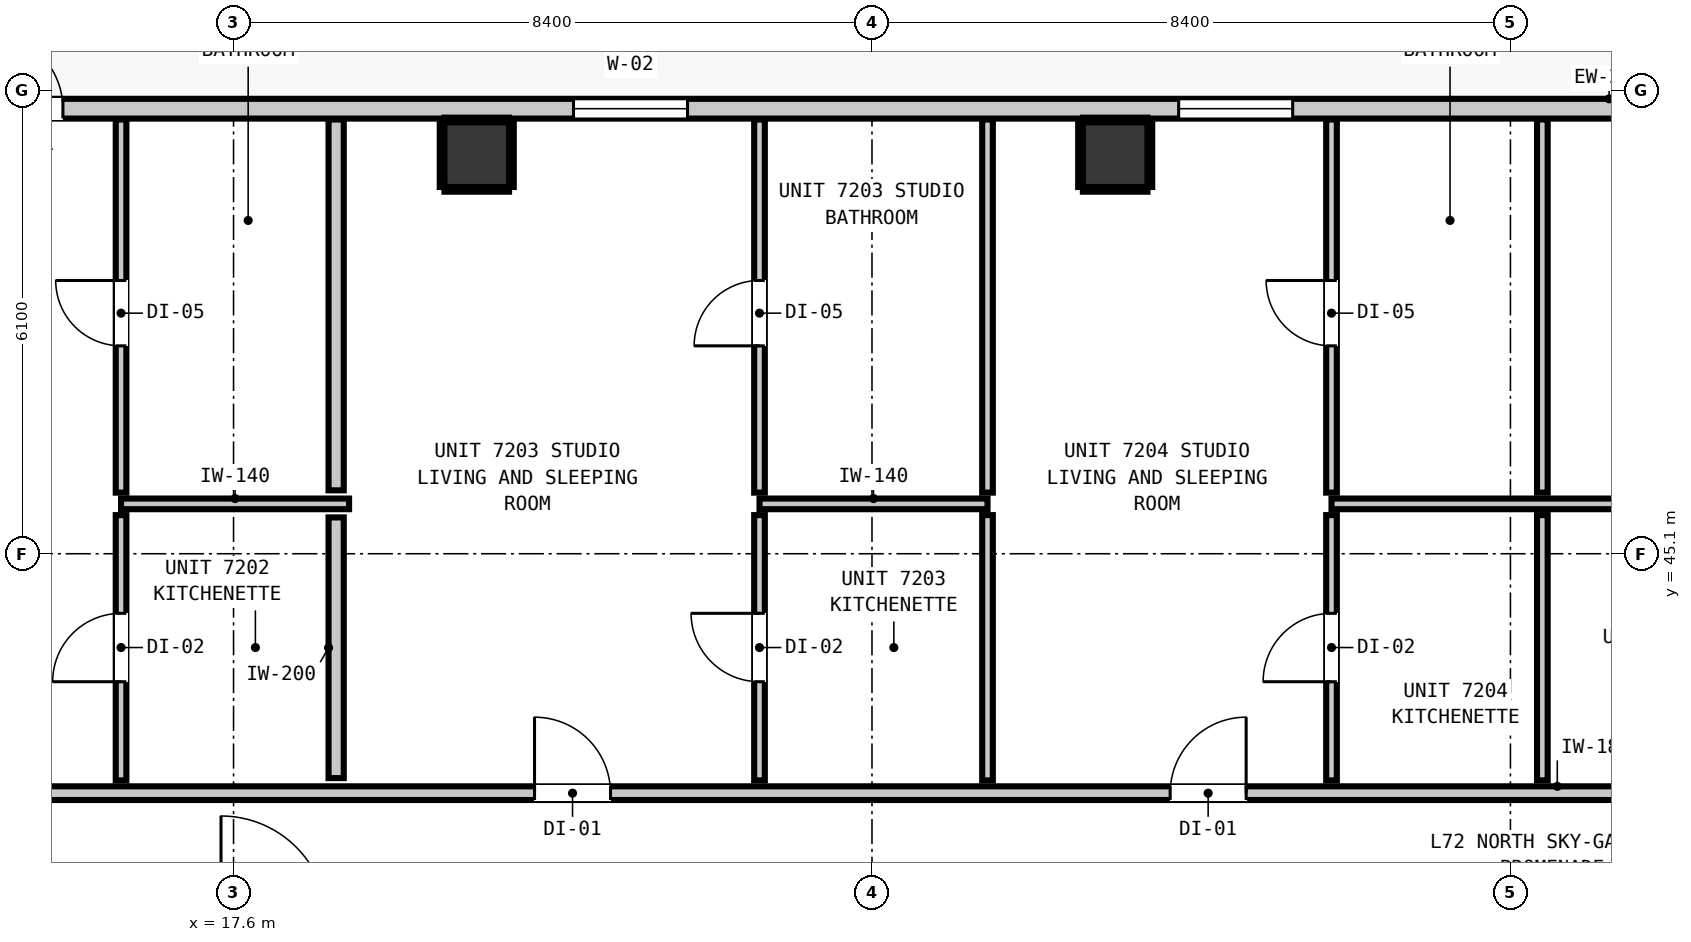
"""IFC4 building model, lengths in metres.
Left out: names, types, materials, properties, quantities, classifications, styles, units other than length and angle.
Written with IfcOpenShell. Run it as: python <this file> out.ifc"""

import sys

from ifc_helpers import new_model, si_unit, direction, frame, frame_2d, origin, origin_2d, place, context, subcontext, project, spatial, rectangle, extrude, element, fill, save


model = new_model("IFC4")
c1 = context("Model", 3, precision=1e-05, world=origin(), true_north=direction((0.0, 1.0)))
c2 = subcontext(c1, "Body", "Model", "MODEL_VIEW")
j1 = project(units=[si_unit("LENGTHUNIT", "METRE"), si_unit("PLANEANGLEUNIT", "RADIAN")], contexts=[c1])
p1 = place(None, origin())
s1 = spatial("IfcSite", under=j1, at=p1, CompositionType="ELEMENT")
p2 = place(p1, origin())
s2 = spatial("IfcBuilding", under=s1, at=p2, CompositionType="ELEMENT")
p3 = place(p2, frame((0.0, 0.0, 247.88)))
s3 = spatial("IfcBuildingStorey", under=s2, at=p3, CompositionType="ELEMENT", Elevation=247.88)
for number, where, z_axis, x_axis in (
    (1, (20.8, 50.35, 0.0), (0.0, 0.0, 1.0), (1.0, 0.0, 0.0)),
    (2, (29.2, 50.35, 0.0), (0.0, 0.0, 1.0), (1.0, 0.0, 0.0)),
):
    element("IfcColumn", number, at=place(p3, frame(where, z_axis=z_axis, x_axis=x_axis)), inside=s3, PredefinedType="COLUMN", context=c2, shape_type="SweptSolid", body=[
        extrude(rectangle(XDim=0.85, YDim=0.85, at=origin_2d()), origin(), (0.0, 0.0, 1.0), 2.9),
    ])
p4 = place(p3, frame((12.745, 50.955, 0.0), z_axis=(0.0, 0.0, 1.0), x_axis=(1.0, 0.0, 0.0)))
e3 = element("IfcWall", 3, at=p4, inside=s3, PredefinedType="STANDARD", context=c2, shape_type="SweptSolid", body=[
    extrude(rectangle(XDim=32.71, YDim=0.26, at=frame_2d((16.355, 0.0))), origin(), (0.0, 0.0, 1.0), 2.9),
])
p5 = place(p4, frame((1.61, 0.0, 0.0)))
e4 = element("IfcOpeningElement", 4, at=p5, cuts=e3, PredefinedType="OPENING", context=c2, shape_type="SweptSolid", body=[
    extrude(rectangle(XDim=1.0, YDim=2.15, at=frame_2d((0.5, 1.075))), frame((0.0, 0.14, 0.0), z_axis=(0.0, -1.0, 0.0), x_axis=(1.0, 0.0, 0.0)), (0.0, 0.0, 1.0), 0.28),
])
p6 = place(p4, frame((9.328, 0.0, 0.85)))
e5 = element("IfcOpeningElement", 5, at=p6, cuts=e3, PredefinedType="OPENING", context=c2, shape_type="SweptSolid", body=[
    extrude(rectangle(XDim=1.5, YDim=1.8, at=frame_2d((0.75, 0.9))), frame((0.0, 0.14, 0.0), z_axis=(0.0, -1.0, 0.0), x_axis=(1.0, 0.0, 0.0)), (0.0, 0.0, 1.0), 0.28),
])
p7 = place(p4, frame((17.29, 0.0, 0.85)))
e6 = element("IfcOpeningElement", 6, at=p7, cuts=e3, PredefinedType="OPENING", context=c2, shape_type="SweptSolid", body=[
    extrude(rectangle(XDim=1.5, YDim=1.8, at=frame_2d((0.75, 0.9))), frame((0.0, 0.14, 0.0), z_axis=(0.0, -1.0, 0.0), x_axis=(1.0, 0.0, 0.0)), (0.0, 0.0, 1.0), 0.28),
])
p8 = place(p4, frame((27.117, 0.0, 0.85)))
e7 = element("IfcOpeningElement", 7, at=p8, cuts=e3, PredefinedType="OPENING", context=c2, shape_type="SweptSolid", body=[
    extrude(rectangle(XDim=1.5, YDim=1.8, at=frame_2d((0.75, 0.9))), frame((0.0, 0.14, 0.0), z_axis=(0.0, -1.0, 0.0), x_axis=(1.0, 0.0, 0.0)), (0.0, 0.0, 1.0), 0.28),
])
p9 = place(p3, frame((10.787, 41.95, 0.0), z_axis=(0.0, 0.0, 1.0), x_axis=(1.0, 0.0, 0.0)))
e8 = element("IfcWall", 8, at=p9, inside=s3, PredefinedType="PARTITIONING", context=c2, shape_type="SweptSolid", body=[
    extrude(rectangle(XDim=36.626, YDim=0.18, at=frame_2d((18.313, 0.0))), origin(), (0.0, 0.0, 1.0), 2.9),
])
p10 = place(p9, frame((3.397, 0.0, 0.0)))
e9 = element("IfcOpeningElement", 9, at=p10, cuts=e8, PredefinedType="OPENING", context=c2, shape_type="SweptSolid", body=[
    extrude(rectangle(XDim=1.0, YDim=2.15, at=frame_2d((0.5, 1.075))), frame((0.0, 0.1, 0.0), z_axis=(0.0, -1.0, 0.0), x_axis=(1.0, 0.0, 0.0)), (0.0, 0.0, 1.0), 0.2),
])
p11 = place(p9, frame((10.773, 0.0, 0.0)))
e10 = element("IfcOpeningElement", 10, at=p11, cuts=e8, PredefinedType="OPENING", context=c2, shape_type="SweptSolid", body=[
    extrude(rectangle(XDim=1.0, YDim=2.15, at=frame_2d((0.5, 1.075))), frame((0.0, 0.1, 0.0), z_axis=(0.0, -1.0, 0.0), x_axis=(1.0, 0.0, 0.0)), (0.0, 0.0, 1.0), 0.2),
])
p12 = place(p9, frame((19.136, 0.0, 0.0)))
e11 = element("IfcOpeningElement", 11, at=p12, cuts=e8, PredefinedType="OPENING", context=c2, shape_type="SweptSolid", body=[
    extrude(rectangle(XDim=1.0, YDim=2.15, at=frame_2d((0.5, 1.075))), frame((0.0, 0.1, 0.0), z_axis=(0.0, -1.0, 0.0), x_axis=(1.0, 0.0, 0.0)), (0.0, 0.0, 1.0), 0.2),
])
p13 = place(p9, frame((28.323, 0.0, 0.0)))
e12 = element("IfcOpeningElement", 12, at=p13, cuts=e8, PredefinedType="OPENING", context=c2, shape_type="SweptSolid", body=[
    extrude(rectangle(XDim=1.0, YDim=2.15, at=frame_2d((0.5, 1.075))), frame((0.0, 0.1, 0.0), z_axis=(0.0, -1.0, 0.0), x_axis=(1.0, 0.0, 0.0)), (0.0, 0.0, 1.0), 0.2),
])
for number, where, z_axis, x_axis in (
    (13, (16.12, 45.756, 0.0), (0.0, 0.0, 1.0), (1.0, 0.0, 0.0)),
    (14, (24.52, 45.756, 0.0), (0.0, 0.0, 1.0), (1.0, 0.0, 0.0)),
):
    element("IfcWall", number, at=place(p3, frame(where, z_axis=z_axis, x_axis=x_axis)), inside=s3, PredefinedType="PARTITIONING", context=c2, shape_type="SweptSolid", body=[
        extrude(rectangle(XDim=3.0, YDim=0.14, at=frame_2d((1.5, 0.0))), origin(), (0.0, 0.0, 1.0), 2.9),
    ])
p14 = place(p3, frame((32.046, 45.756, 0.0), z_axis=(0.0, 0.0, 1.0), x_axis=(1.0, 0.0, 0.0)))
e15 = element("IfcWall", 15, at=p14, inside=s3, PredefinedType="PARTITIONING", context=c2, shape_type="SweptSolid", body=[
    extrude(rectangle(XDim=15.367, YDim=0.14, at=frame_2d((7.684, 0.0))), origin(), (0.0, 0.0, 1.0), 2.9),
])
p15 = place(p14, frame((7.114, 0.0, 0.0)))
e16 = element("IfcOpeningElement", 16, at=p15, cuts=e15, PredefinedType="OPENING", context=c2, shape_type="SweptSolid", body=[
    extrude(rectangle(XDim=0.9, YDim=2.1, at=frame_2d((0.45, 1.05))), frame((0.0, 0.08, 0.0), z_axis=(0.0, -1.0, 0.0), x_axis=(1.0, 0.0, 0.0)), (0.0, 0.0, 1.0), 0.16),
])
p16 = place(p3, frame((18.95, 42.148, 0.0), z_axis=(0.0, 0.0, 1.0), x_axis=(0.0, 1.0, 0.0)))
e17 = element("IfcWall", 17, at=p16, inside=s3, PredefinedType="PARTITIONING", context=c2, shape_type="SweptSolid", body=[
    extrude(rectangle(XDim=3.43, YDim=0.2, at=frame_2d((1.715, 0.0))), origin(), (0.0, 0.0, 1.0), 2.9),
])
p17 = place(p3, frame((18.95, 45.934, 0.0), z_axis=(0.0, 0.0, 1.0), x_axis=(0.0, 1.0, 0.0)))
e18 = element("IfcWall", 18, at=p17, inside=s3, PredefinedType="PARTITIONING", context=c2, shape_type="SweptSolid", body=[
    extrude(rectangle(XDim=4.879, YDim=0.2, at=frame_2d((2.439, 0.0))), origin(), (0.0, 0.0, 1.0), 2.9),
])
p18 = place(p3, frame((16.12, 42.118, 0.0), z_axis=(0.0, 0.0, 1.0), x_axis=(0.0, 1.0, 0.0)))
e19 = element("IfcWall", 19, at=p18, inside=s3, PredefinedType="PARTITIONING", context=c2, shape_type="SweptSolid", body=[
    extrude(rectangle(XDim=3.49, YDim=0.14, at=frame_2d((1.745, 0.0))), origin(), (0.0, 0.0, 1.0), 2.9),
])
p19 = place(p18, frame((1.298, 0.0, 0.0)))
e20 = element("IfcOpeningElement", 20, at=p19, cuts=e19, PredefinedType="OPENING", context=c2, shape_type="SweptSolid", body=[
    extrude(rectangle(XDim=0.9, YDim=2.1, at=frame_2d((0.45, 1.05))), frame((0.0, 0.08, 0.0), z_axis=(0.0, -1.0, 0.0), x_axis=(1.0, 0.0, 0.0)), (0.0, 0.0, 1.0), 0.16),
])
p20 = place(p3, frame((16.12, 45.904, 0.0), z_axis=(0.0, 0.0, 1.0), x_axis=(0.0, 1.0, 0.0)))
e21 = element("IfcWall", 21, at=p20, inside=s3, PredefinedType="PARTITIONING", context=c2, shape_type="SweptSolid", body=[
    extrude(rectangle(XDim=4.909, YDim=0.14, at=frame_2d((2.455, 0.0))), origin(), (0.0, 0.0, 1.0), 2.9),
])
p21 = place(p20, frame((1.931, 0.0, 0.0)))
e22 = element("IfcOpeningElement", 22, at=p21, cuts=e21, PredefinedType="OPENING", context=c2, shape_type="SweptSolid", body=[
    extrude(rectangle(XDim=0.86, YDim=2.02, at=frame_2d((0.43, 1.01))), frame((0.0, 0.08, 0.0), z_axis=(0.0, -1.0, 0.0), x_axis=(1.0, 0.0, 0.0)), (0.0, 0.0, 1.0), 0.16),
])
p22 = place(p3, frame((24.52, 42.118, 0.0), z_axis=(0.0, 0.0, 1.0), x_axis=(0.0, 1.0, 0.0)))
e23 = element("IfcWall", 23, at=p22, inside=s3, PredefinedType="PARTITIONING", context=c2, shape_type="SweptSolid", body=[
    extrude(rectangle(XDim=3.49, YDim=0.14, at=frame_2d((1.745, 0.0))), origin(), (0.0, 0.0, 1.0), 2.9),
])
p23 = place(p22, frame((1.298, 0.0, 0.0)))
e24 = element("IfcOpeningElement", 24, at=p23, cuts=e23, PredefinedType="OPENING", context=c2, shape_type="SweptSolid", body=[
    extrude(rectangle(XDim=0.9, YDim=2.1, at=frame_2d((0.45, 1.05))), frame((0.0, 0.08, 0.0), z_axis=(0.0, -1.0, 0.0), x_axis=(1.0, 0.0, 0.0)), (0.0, 0.0, 1.0), 0.16),
])
p24 = place(p3, frame((24.52, 45.904, 0.0), z_axis=(0.0, 0.0, 1.0), x_axis=(0.0, 1.0, 0.0)))
e25 = element("IfcWall", 25, at=p24, inside=s3, PredefinedType="PARTITIONING", context=c2, shape_type="SweptSolid", body=[
    extrude(rectangle(XDim=4.909, YDim=0.14, at=frame_2d((2.455, 0.0))), origin(), (0.0, 0.0, 1.0), 2.9),
])
p25 = place(p24, frame((1.931, 0.0, 0.0)))
e26 = element("IfcOpeningElement", 26, at=p25, cuts=e25, PredefinedType="OPENING", context=c2, shape_type="SweptSolid", body=[
    extrude(rectangle(XDim=0.86, YDim=2.02, at=frame_2d((0.43, 1.01))), frame((0.0, 0.08, 0.0), z_axis=(0.0, -1.0, 0.0), x_axis=(1.0, 0.0, 0.0)), (0.0, 0.0, 1.0), 0.16),
])
p26 = place(p3, frame((27.52, 42.118, 0.0), z_axis=(0.0, 0.0, 1.0), x_axis=(0.0, 1.0, 0.0)))
e27 = element("IfcWall", 27, at=p26, inside=s3, PredefinedType="PARTITIONING", context=c2, shape_type="SweptSolid", body=[
    extrude(rectangle(XDim=3.49, YDim=0.14, at=frame_2d((1.745, 0.0))), origin(), (0.0, 0.0, 1.0), 2.9),
])
p27 = place(p3, frame((27.52, 45.904, 0.0), z_axis=(0.0, 0.0, 1.0), x_axis=(0.0, 1.0, 0.0)))
e28 = element("IfcWall", 28, at=p27, inside=s3, PredefinedType="PARTITIONING", context=c2, shape_type="SweptSolid", body=[
    extrude(rectangle(XDim=4.909, YDim=0.14, at=frame_2d((2.455, 0.0))), origin(), (0.0, 0.0, 1.0), 2.9),
])
p28 = place(p3, frame((32.046, 42.118, 0.0), z_axis=(0.0, 0.0, 1.0), x_axis=(0.0, 1.0, 0.0)))
e29 = element("IfcWall", 29, at=p28, inside=s3, PredefinedType="PARTITIONING", context=c2, shape_type="SweptSolid", body=[
    extrude(rectangle(XDim=3.49, YDim=0.14, at=frame_2d((1.745, 0.0))), origin(), (0.0, 0.0, 1.0), 2.9),
])
p29 = place(p28, frame((1.298, 0.0, 0.0)))
e30 = element("IfcOpeningElement", 30, at=p29, cuts=e29, PredefinedType="OPENING", context=c2, shape_type="SweptSolid", body=[
    extrude(rectangle(XDim=0.9, YDim=2.1, at=frame_2d((0.45, 1.05))), frame((0.0, 0.08, 0.0), z_axis=(0.0, -1.0, 0.0), x_axis=(1.0, 0.0, 0.0)), (0.0, 0.0, 1.0), 0.16),
])
p30 = place(p3, frame((32.046, 45.904, 0.0), z_axis=(0.0, 0.0, 1.0), x_axis=(0.0, 1.0, 0.0)))
e31 = element("IfcWall", 31, at=p30, inside=s3, PredefinedType="PARTITIONING", context=c2, shape_type="SweptSolid", body=[
    extrude(rectangle(XDim=4.909, YDim=0.14, at=frame_2d((2.455, 0.0))), origin(), (0.0, 0.0, 1.0), 2.9),
])
p31 = place(p30, frame((1.931, 0.0, 0.0)))
e32 = element("IfcOpeningElement", 32, at=p31, cuts=e31, PredefinedType="OPENING", context=c2, shape_type="SweptSolid", body=[
    extrude(rectangle(XDim=0.86, YDim=2.02, at=frame_2d((0.43, 1.01))), frame((0.0, 0.08, 0.0), z_axis=(0.0, -1.0, 0.0), x_axis=(1.0, 0.0, 0.0)), (0.0, 0.0, 1.0), 0.16),
])
p32 = place(p3, frame((34.82, 42.118, 0.0), z_axis=(0.0, 0.0, 1.0), x_axis=(0.0, 1.0, 0.0)))
e33 = element("IfcWall", 33, at=p32, inside=s3, PredefinedType="PARTITIONING", context=c2, shape_type="SweptSolid", body=[
    extrude(rectangle(XDim=3.49, YDim=0.14, at=frame_2d((1.745, 0.0))), origin(), (0.0, 0.0, 1.0), 2.9),
])
p33 = place(p3, frame((34.82, 45.904, 0.0), z_axis=(0.0, 0.0, 1.0), x_axis=(0.0, 1.0, 0.0)))
e34 = element("IfcWall", 34, at=p33, inside=s3, PredefinedType="PARTITIONING", context=c2, shape_type="SweptSolid", body=[
    extrude(rectangle(XDim=4.909, YDim=0.14, at=frame_2d((2.455, 0.0))), origin(), (0.0, 0.0, 1.0), 2.9),
])
for number, where, z_axis, x_axis in (
    (35, (20.375, 49.893, 0.0), (0.0, 0.0, 1.0), (1.0, 0.0, 0.0)),
    (36, (20.375, 50.807, 0.0), (0.0, 0.0, 1.0), (1.0, 0.0, 0.0)),
):
    element("IfcWall", number, at=place(p3, frame(where, z_axis=z_axis, x_axis=x_axis)), inside=s3, PredefinedType="PARTITIONING", context=c2, shape_type="SweptSolid", body=[
        extrude(rectangle(XDim=0.85, YDim=0.06, at=frame_2d((0.425, 0.0))), origin(), (0.0, 0.0, 1.0), 1.45),
    ])
for number, where, z_axis, x_axis in (
    (37, (20.343, 49.925, 0.0), (0.0, 0.0, 1.0), (0.0, 1.0, 0.0)),
    (38, (21.257, 49.925, 0.0), (0.0, 0.0, 1.0), (0.0, 1.0, 0.0)),
):
    element("IfcWall", number, at=place(p3, frame(where, z_axis=z_axis, x_axis=x_axis)), inside=s3, PredefinedType="PARTITIONING", context=c2, shape_type="SweptSolid", body=[
        extrude(rectangle(XDim=0.85, YDim=0.06, at=frame_2d((0.425, 0.0))), origin(), (0.0, 0.0, 1.0), 0.905),
    ])
for number, where, z_axis, x_axis in (
    (39, (28.775, 49.893, 0.0), (0.0, 0.0, 1.0), (1.0, 0.0, 0.0)),
    (40, (28.775, 50.807, 0.0), (0.0, 0.0, 1.0), (1.0, 0.0, 0.0)),
):
    element("IfcWall", number, at=place(p3, frame(where, z_axis=z_axis, x_axis=x_axis)), inside=s3, PredefinedType="PARTITIONING", context=c2, shape_type="SweptSolid", body=[
        extrude(rectangle(XDim=0.85, YDim=0.06, at=frame_2d((0.425, 0.0))), origin(), (0.0, 0.0, 1.0), 1.45),
    ])
for number, where, z_axis, x_axis in (
    (41, (28.743, 49.925, 0.0), (0.0, 0.0, 1.0), (0.0, 1.0, 0.0)),
    (42, (29.657, 49.925, 0.0), (0.0, 0.0, 1.0), (0.0, 1.0, 0.0)),
):
    element("IfcWall", number, at=place(p3, frame(where, z_axis=z_axis, x_axis=x_axis)), inside=s3, PredefinedType="PARTITIONING", context=c2, shape_type="SweptSolid", body=[
        extrude(rectangle(XDim=0.85, YDim=0.06, at=frame_2d((0.425, 0.0))), origin(), (0.0, 0.0, 1.0), 0.905),
    ])
p34 = place(p5, origin())
e43 = element("IfcDoor", 43, at=p34, inside=s3, OperationType="SINGLE_SWING_LEFT", PredefinedType="DOOR", context=c2, shape_type="SweptSolid", body=[
    extrude(rectangle(XDim=1.0, YDim=2.15, at=frame_2d((0.5, 1.075))), frame((0.0, 0.025, 0.0), z_axis=(0.0, -1.0, 0.0), x_axis=(1.0, 0.0, 0.0)), (0.0, 0.0, 1.0), 0.05),
])
fill(e4, e43)
p35 = place(p6, origin())
e44 = element("IfcWindow", 44, at=p35, inside=s3, PartitioningType="SINGLE_PANEL", PredefinedType="WINDOW", context=c2, shape_type="SweptSolid", body=[
    extrude(rectangle(XDim=1.5, YDim=1.8, at=frame_2d((0.75, 0.9))), frame((0.0, 0.03, 0.0), z_axis=(0.0, -1.0, 0.0), x_axis=(1.0, 0.0, 0.0)), (0.0, 0.0, 1.0), 0.06),
])
fill(e5, e44)
p36 = place(p7, origin())
e45 = element("IfcWindow", 45, at=p36, inside=s3, PartitioningType="SINGLE_PANEL", PredefinedType="WINDOW", context=c2, shape_type="SweptSolid", body=[
    extrude(rectangle(XDim=1.5, YDim=1.8, at=frame_2d((0.75, 0.9))), frame((0.0, 0.03, 0.0), z_axis=(0.0, -1.0, 0.0), x_axis=(1.0, 0.0, 0.0)), (0.0, 0.0, 1.0), 0.06),
])
fill(e6, e45)
p37 = place(p19, origin())
e46 = element("IfcDoor", 46, at=p37, inside=s3, OperationType="SINGLE_SWING_LEFT", PredefinedType="DOOR", context=c2, shape_type="SweptSolid", body=[
    extrude(rectangle(XDim=0.9, YDim=2.1, at=frame_2d((0.45, 1.05))), frame((0.0, 0.025, 0.0), z_axis=(0.0, -1.0, 0.0), x_axis=(1.0, 0.0, 0.0)), (0.0, 0.0, 1.0), 0.05),
])
fill(e20, e46)
p38 = place(p21, origin())
e47 = element("IfcDoor", 47, at=p38, inside=s3, OperationType="SINGLE_SWING_RIGHT", PredefinedType="DOOR", context=c2, shape_type="SweptSolid", body=[
    extrude(rectangle(XDim=0.86, YDim=2.02, at=frame_2d((0.43, 1.01))), frame((0.0, 0.025, 0.0), z_axis=(0.0, -1.0, 0.0), x_axis=(1.0, 0.0, 0.0)), (0.0, 0.0, 1.0), 0.05),
])
fill(e22, e47)
p39 = place(p11, origin())
e48 = element("IfcDoor", 48, at=p39, inside=s3, OperationType="SINGLE_SWING_LEFT", PredefinedType="DOOR", context=c2, shape_type="SweptSolid", body=[
    extrude(rectangle(XDim=1.0, YDim=2.15, at=frame_2d((0.5, 1.075))), frame((0.0, 0.025, 0.0), z_axis=(0.0, -1.0, 0.0), x_axis=(1.0, 0.0, 0.0)), (0.0, 0.0, 1.0), 0.05),
])
fill(e10, e48)
p40 = place(p23, origin())
e49 = element("IfcDoor", 49, at=p40, inside=s3, OperationType="SINGLE_SWING_RIGHT", PredefinedType="DOOR", context=c2, shape_type="SweptSolid", body=[
    extrude(rectangle(XDim=0.9, YDim=2.1, at=frame_2d((0.45, 1.05))), frame((0.0, 0.025, 0.0), z_axis=(0.0, -1.0, 0.0), x_axis=(1.0, 0.0, 0.0)), (0.0, 0.0, 1.0), 0.05),
])
fill(e24, e49)
p41 = place(p25, origin())
e50 = element("IfcDoor", 50, at=p41, inside=s3, OperationType="SINGLE_SWING_LEFT", PredefinedType="DOOR", context=c2, shape_type="SweptSolid", body=[
    extrude(rectangle(XDim=0.86, YDim=2.02, at=frame_2d((0.43, 1.01))), frame((0.0, 0.025, 0.0), z_axis=(0.0, -1.0, 0.0), x_axis=(1.0, 0.0, 0.0)), (0.0, 0.0, 1.0), 0.05),
])
fill(e26, e50)
p42 = place(p12, origin())
e51 = element("IfcDoor", 51, at=p42, inside=s3, OperationType="SINGLE_SWING_RIGHT", PredefinedType="DOOR", context=c2, shape_type="SweptSolid", body=[
    extrude(rectangle(XDim=1.0, YDim=2.15, at=frame_2d((0.5, 1.075))), frame((0.0, 0.025, 0.0), z_axis=(0.0, -1.0, 0.0), x_axis=(1.0, 0.0, 0.0)), (0.0, 0.0, 1.0), 0.05),
])
fill(e11, e51)
p43 = place(p29, origin())
e52 = element("IfcDoor", 52, at=p43, inside=s3, OperationType="SINGLE_SWING_LEFT", PredefinedType="DOOR", context=c2, shape_type="SweptSolid", body=[
    extrude(rectangle(XDim=0.9, YDim=2.1, at=frame_2d((0.45, 1.05))), frame((0.0, 0.025, 0.0), z_axis=(0.0, -1.0, 0.0), x_axis=(1.0, 0.0, 0.0)), (0.0, 0.0, 1.0), 0.05),
])
fill(e30, e52)
p44 = place(p31, origin())
e53 = element("IfcDoor", 53, at=p44, inside=s3, OperationType="SINGLE_SWING_RIGHT", PredefinedType="DOOR", context=c2, shape_type="SweptSolid", body=[
    extrude(rectangle(XDim=0.86, YDim=2.02, at=frame_2d((0.43, 1.01))), frame((0.0, 0.025, 0.0), z_axis=(0.0, -1.0, 0.0), x_axis=(1.0, 0.0, 0.0)), (0.0, 0.0, 1.0), 0.05),
])
fill(e32, e53)
save(model, sys.argv[1])
